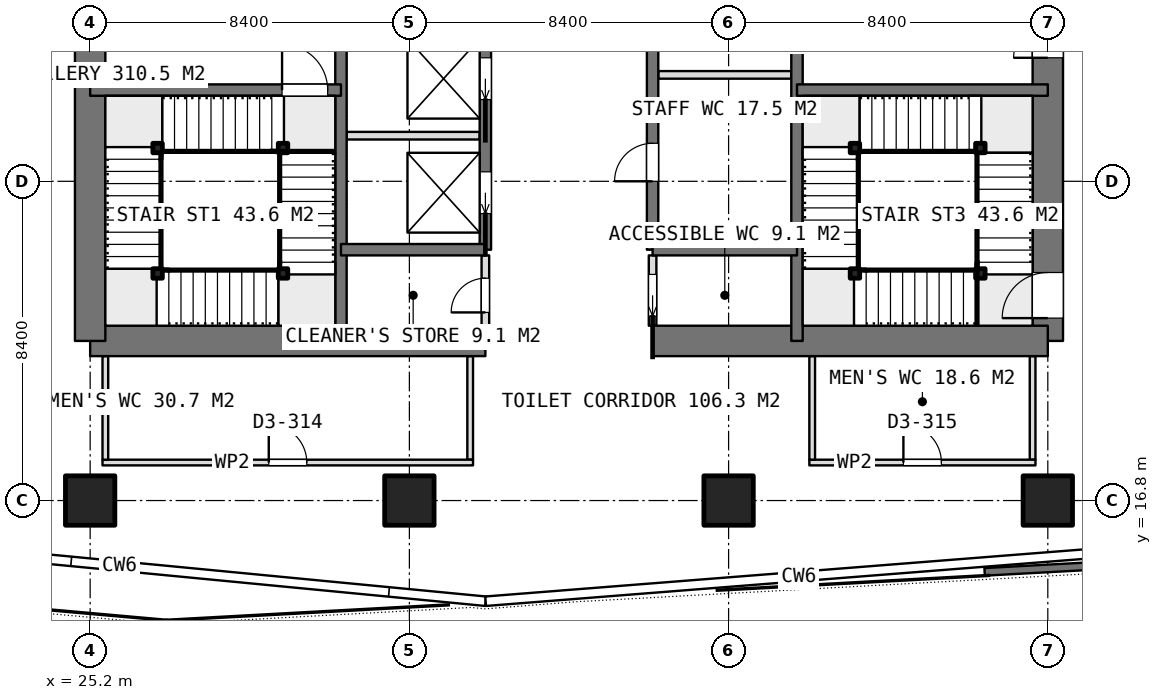
"""IFC4 building model, lengths in metres.
Left out: names, types, materials, properties, quantities, classifications, styles, units other than length and angle.
Written with IfcOpenShell. Run it as: python <this file> out.ifc"""

import sys

from ifc_helpers import new_model, si_unit, direction, frame, frame_2d, origin, origin_2d, place, context, subcontext, project, spatial, rectangle, extrude, element, fill, save


model = new_model("IFC4")
c1 = context("Model", 3, precision=1e-05, world=origin(), true_north=direction((0.0, 1.0)))
c2 = subcontext(c1, "Body", "Model", "MODEL_VIEW")
j1 = project(units=[si_unit("LENGTHUNIT", "METRE"), si_unit("PLANEANGLEUNIT", "RADIAN")], contexts=[c1])
p1 = place(None, origin())
s1 = spatial("IfcSite", under=j1, at=p1, CompositionType="ELEMENT")
p2 = place(p1, origin())
s2 = spatial("IfcBuilding", under=s1, at=p2, CompositionType="ELEMENT")
p3 = place(p2, frame((0.0, 0.0, 291.35)))
s3 = spatial("IfcBuildingStorey", under=s2, at=p3, CompositionType="ELEMENT", Elevation=291.35)
p4 = place(p3, frame((25.2, 21.0, 0.0), z_axis=(0.0, 0.0, 1.0), x_axis=(1.0, 0.0, 0.0)))
e1 = element("IfcWall", 1, at=p4, inside=s3, PredefinedType="SHEAR", context=c2, shape_type="SweptSolid", body=[
    extrude(rectangle(XDim=10.4, YDim=0.8, at=frame_2d((5.2, 0.0))), origin(), (0.0, 0.0, 1.0), 5.4),
])
p5 = place(p3, frame((40.0, 21.0, 0.0), z_axis=(0.0, 0.0, 1.0), x_axis=(1.0, 0.0, 0.0)))
e2 = element("IfcWall", 2, at=p5, inside=s3, PredefinedType="SHEAR", context=c2, shape_type="SweptSolid", body=[
    extrude(rectangle(XDim=10.4, YDim=0.8, at=frame_2d((5.2, 0.0))), origin(), (0.0, 0.0, 1.0), 5.4),
])
p6 = place(p3, frame((25.2, 21.0, 0.0), z_axis=(0.0, 0.0, 1.0), x_axis=(0.0, 1.0, 0.0)))
e3 = element("IfcWall", 3, at=p6, inside=s3, PredefinedType="SHEAR", context=c2, shape_type="SweptSolid", body=[
    extrude(rectangle(XDim=25.2, YDim=0.8, at=frame_2d((12.6, 0.0))), origin(), (0.0, 0.0, 1.0), 5.4),
])
p7 = place(p6, frame((7.8, 0.0, 0.0)))
e4 = element("IfcOpeningElement", 4, at=p7, cuts=e3, PredefinedType="OPENING", context=c2, shape_type="SweptSolid", body=[
    extrude(rectangle(XDim=1.2, YDim=2.1, at=frame_2d((0.6, 1.05))), frame((0.0, 0.41, 0.0), z_axis=(0.0, -1.0, 0.0), x_axis=(1.0, 0.0, 0.0)), (0.0, 0.0, 1.0), 0.82),
])
p8 = place(p6, frame((14.25, 0.0, 0.0)))
e5 = element("IfcOpeningElement", 5, at=p8, cuts=e3, PredefinedType="OPENING", context=c2, shape_type="SweptSolid", body=[
    extrude(rectangle(XDim=0.9, YDim=2.1, at=frame_2d((0.45, 1.05))), frame((0.0, 0.41, 0.0), z_axis=(0.0, -1.0, 0.0), x_axis=(1.0, 0.0, 0.0)), (0.0, 0.0, 1.0), 0.82),
])
p9 = place(p6, frame((16.85, 0.0, 0.0)))
e6 = element("IfcOpeningElement", 6, at=p9, cuts=e3, PredefinedType="OPENING", context=c2, shape_type="SweptSolid", body=[
    extrude(rectangle(XDim=0.9, YDim=2.1, at=frame_2d((0.45, 1.05))), frame((0.0, 0.41, 0.0), z_axis=(0.0, -1.0, 0.0), x_axis=(1.0, 0.0, 0.0)), (0.0, 0.0, 1.0), 0.82),
])
p10 = place(p6, frame((18.95, 0.0, 0.0)))
e7 = element("IfcOpeningElement", 7, at=p10, cuts=e3, PredefinedType="OPENING", context=c2, shape_type="SweptSolid", body=[
    extrude(rectangle(XDim=1.2, YDim=2.1, at=frame_2d((0.6, 1.05))), frame((0.0, 0.41, 0.0), z_axis=(0.0, -1.0, 0.0), x_axis=(1.0, 0.0, 0.0)), (0.0, 0.0, 1.0), 0.82),
])
p11 = place(p3, frame((50.4, 21.0, 0.0), z_axis=(0.0, 0.0, 1.0), x_axis=(0.0, 1.0, 0.0)))
e8 = element("IfcWall", 8, at=p11, inside=s3, PredefinedType="SHEAR", context=c2, shape_type="SweptSolid", body=[
    extrude(rectangle(XDim=25.2, YDim=0.8, at=frame_2d((12.6, 0.0))), origin(), (0.0, 0.0, 1.0), 5.4),
])
p12 = place(p11, frame((16.2, 0.0, 0.0)))
e9 = element("IfcOpeningElement", 9, at=p12, cuts=e8, PredefinedType="OPENING", context=c2, shape_type="SweptSolid", body=[
    extrude(rectangle(XDim=1.2, YDim=2.1, at=frame_2d((0.6, 1.05))), frame((0.0, 0.41, 0.0), z_axis=(0.0, -1.0, 0.0), x_axis=(1.0, 0.0, 0.0)), (0.0, 0.0, 1.0), 0.82),
])
p13 = place(p11, frame((10.05, 0.0, 0.0)))
e10 = element("IfcOpeningElement", 10, at=p13, cuts=e8, PredefinedType="OPENING", context=c2, shape_type="SweptSolid", body=[
    extrude(rectangle(XDim=0.9, YDim=2.1, at=frame_2d((0.45, 1.05))), frame((0.0, 0.41, 0.0), z_axis=(0.0, -1.0, 0.0), x_axis=(1.0, 0.0, 0.0)), (0.0, 0.0, 1.0), 0.82),
])
p14 = place(p11, frame((7.45, 0.0, 0.0)))
e11 = element("IfcOpeningElement", 11, at=p14, cuts=e8, PredefinedType="OPENING", context=c2, shape_type="SweptSolid", body=[
    extrude(rectangle(XDim=0.9, YDim=2.1, at=frame_2d((0.45, 1.05))), frame((0.0, 0.41, 0.0), z_axis=(0.0, -1.0, 0.0), x_axis=(1.0, 0.0, 0.0)), (0.0, 0.0, 1.0), 0.82),
])
p15 = place(p11, frame((0.6, 0.0, 0.0)))
e12 = element("IfcOpeningElement", 12, at=p15, cuts=e8, PredefinedType="OPENING", context=c2, shape_type="SweptSolid", body=[
    extrude(rectangle(XDim=1.2, YDim=2.1, at=frame_2d((0.6, 1.05))), frame((0.0, 0.41, 0.0), z_axis=(0.0, -1.0, 0.0), x_axis=(1.0, 0.0, 0.0)), (0.0, 0.0, 1.0), 0.82),
])
for number, where, z_axis, x_axis in (
    (13, (31.8, 21.0, 0.0), (0.0, 0.0, 1.0), (0.0, 1.0, 0.0)),
    (14, (43.8, 21.0, 0.0), (0.0, 0.0, 1.0), (0.0, 1.0, 0.0)),
):
    element("IfcWall", number, at=place(p3, frame(where, z_axis=z_axis, x_axis=x_axis)), inside=s3, PredefinedType="SHEAR", context=c2, shape_type="SweptSolid", body=[
        extrude(rectangle(XDim=25.2, YDim=0.3, at=frame_2d((12.6, 0.0))), origin(), (0.0, 0.0, 1.0), 5.4),
    ])
p16 = place(p3, frame((35.6, 23.4, 0.0), z_axis=(0.0, 0.0, 1.0), x_axis=(0.0, 1.0, 0.0)))
e15 = element("IfcWall", 15, at=p16, inside=s3, PredefinedType="SHEAR", context=c2, shape_type="SweptSolid", body=[
    extrude(rectangle(XDim=18.0, YDim=0.3, at=frame_2d((9.0, 0.0))), origin(), (0.0, 0.0, 1.0), 5.4),
])
p17 = place(p16, frame((0.95, 0.0, 0.0)))
e16 = element("IfcOpeningElement", 16, at=p17, cuts=e15, PredefinedType="OPENING", context=c2, shape_type="SweptSolid", body=[
    extrude(rectangle(XDim=1.1, YDim=2.1, at=frame_2d((0.55, 1.05))), frame((0.0, 0.16, 0.0), z_axis=(0.0, -1.0, 0.0), x_axis=(1.0, 0.0, 0.0)), (0.0, 0.0, 1.0), 0.32),
])
p18 = place(p16, frame((3.95, 0.0, 0.0)))
e17 = element("IfcOpeningElement", 17, at=p18, cuts=e15, PredefinedType="OPENING", context=c2, shape_type="SweptSolid", body=[
    extrude(rectangle(XDim=1.1, YDim=2.1, at=frame_2d((0.55, 1.05))), frame((0.0, 0.16, 0.0), z_axis=(0.0, -1.0, 0.0), x_axis=(1.0, 0.0, 0.0)), (0.0, 0.0, 1.0), 0.32),
])
p19 = place(p16, frame((6.95, 0.0, 0.0)))
e18 = element("IfcOpeningElement", 18, at=p19, cuts=e15, PredefinedType="OPENING", context=c2, shape_type="SweptSolid", body=[
    extrude(rectangle(XDim=1.1, YDim=2.1, at=frame_2d((0.55, 1.05))), frame((0.0, 0.16, 0.0), z_axis=(0.0, -1.0, 0.0), x_axis=(1.0, 0.0, 0.0)), (0.0, 0.0, 1.0), 0.32),
])
p20 = place(p16, frame((9.95, 0.0, 0.0)))
e19 = element("IfcOpeningElement", 19, at=p20, cuts=e15, PredefinedType="OPENING", context=c2, shape_type="SweptSolid", body=[
    extrude(rectangle(XDim=1.1, YDim=2.1, at=frame_2d((0.55, 1.05))), frame((0.0, 0.16, 0.0), z_axis=(0.0, -1.0, 0.0), x_axis=(1.0, 0.0, 0.0)), (0.0, 0.0, 1.0), 0.32),
])
p21 = place(p16, frame((12.95, 0.0, 0.0)))
e20 = element("IfcOpeningElement", 20, at=p21, cuts=e15, PredefinedType="OPENING", context=c2, shape_type="SweptSolid", body=[
    extrude(rectangle(XDim=1.1, YDim=2.1, at=frame_2d((0.55, 1.05))), frame((0.0, 0.16, 0.0), z_axis=(0.0, -1.0, 0.0), x_axis=(1.0, 0.0, 0.0)), (0.0, 0.0, 1.0), 0.32),
])
p22 = place(p16, frame((15.95, 0.0, 0.0)))
e21 = element("IfcOpeningElement", 21, at=p22, cuts=e15, PredefinedType="OPENING", context=c2, shape_type="SweptSolid", body=[
    extrude(rectangle(XDim=1.1, YDim=2.1, at=frame_2d((0.55, 1.05))), frame((0.0, 0.16, 0.0), z_axis=(0.0, -1.0, 0.0), x_axis=(1.0, 0.0, 0.0)), (0.0, 0.0, 1.0), 0.32),
])
p23 = place(p3, frame((40.0, 23.4, 0.0), z_axis=(0.0, 0.0, 1.0), x_axis=(0.0, 1.0, 0.0)))
e22 = element("IfcWall", 22, at=p23, inside=s3, PredefinedType="SHEAR", context=c2, shape_type="SweptSolid", body=[
    extrude(rectangle(XDim=18.0, YDim=0.3, at=frame_2d((9.0, 0.0))), origin(), (0.0, 0.0, 1.0), 5.4),
])
p24 = place(p23, frame((1.8, 0.0, 0.0)))
e23 = element("IfcOpeningElement", 23, at=p24, cuts=e22, PredefinedType="OPENING", context=c2, shape_type="SweptSolid", body=[
    extrude(rectangle(XDim=1.0, YDim=2.1, at=frame_2d((0.5, 1.05))), frame((0.0, 0.16, 0.0), z_axis=(0.0, -1.0, 0.0), x_axis=(1.0, 0.0, 0.0)), (0.0, 0.0, 1.0), 0.32),
])
p25 = place(p23, frame((5.75, 0.0, 0.0)))
e24 = element("IfcOpeningElement", 24, at=p25, cuts=e22, PredefinedType="OPENING", context=c2, shape_type="SweptSolid", body=[
    extrude(rectangle(XDim=0.9, YDim=2.1, at=frame_2d((0.45, 1.05))), frame((0.0, 0.16, 0.0), z_axis=(0.0, -1.0, 0.0), x_axis=(1.0, 0.0, 0.0)), (0.0, 0.0, 1.0), 0.32),
])
p26 = place(p23, frame((9.4, 0.0, 0.0)))
e25 = element("IfcOpeningElement", 25, at=p26, cuts=e22, PredefinedType="OPENING", context=c2, shape_type="SweptSolid", body=[
    extrude(rectangle(XDim=1.0, YDim=2.1, at=frame_2d((0.5, 1.05))), frame((0.0, 0.16, 0.0), z_axis=(0.0, -1.0, 0.0), x_axis=(1.0, 0.0, 0.0)), (0.0, 0.0, 1.0), 0.32),
])
p27 = place(p23, frame((12.95, 0.0, 0.0)))
e26 = element("IfcOpeningElement", 26, at=p27, cuts=e22, PredefinedType="OPENING", context=c2, shape_type="SweptSolid", body=[
    extrude(rectangle(XDim=1.1, YDim=2.1, at=frame_2d((0.55, 1.05))), frame((0.0, 0.16, 0.0), z_axis=(0.0, -1.0, 0.0), x_axis=(1.0, 0.0, 0.0)), (0.0, 0.0, 1.0), 0.32),
])
p28 = place(p23, frame((15.95, 0.0, 0.0)))
e27 = element("IfcOpeningElement", 27, at=p28, cuts=e22, PredefinedType="OPENING", context=c2, shape_type="SweptSolid", body=[
    extrude(rectangle(XDim=1.1, YDim=2.1, at=frame_2d((0.55, 1.05))), frame((0.0, 0.16, 0.0), z_axis=(0.0, -1.0, 0.0), x_axis=(1.0, 0.0, 0.0)), (0.0, 0.0, 1.0), 0.32),
])
for number, where, z_axis, x_axis in (
    (28, (31.8, 23.4, 0.0), (0.0, 0.0, 1.0), (1.0, 0.0, 0.0)),
    (29, (40.0, 23.4, 0.0), (0.0, 0.0, 1.0), (1.0, 0.0, 0.0)),
):
    element("IfcWall", number, at=place(p3, frame(where, z_axis=z_axis, x_axis=x_axis)), inside=s3, PredefinedType="SHEAR", context=c2, shape_type="SweptSolid", body=[
        extrude(rectangle(XDim=3.8, YDim=0.3, at=frame_2d((1.9, 0.0))), origin(), (0.0, 0.0, 1.0), 5.4),
    ])
p29 = place(p3, frame((25.2, 27.6, 0.0), z_axis=(0.0, 0.0, 1.0), x_axis=(1.0, 0.0, 0.0)))
e30 = element("IfcWall", 30, at=p29, inside=s3, PredefinedType="SHEAR", context=c2, shape_type="SweptSolid", body=[
    extrude(rectangle(XDim=6.6, YDim=0.3, at=frame_2d((3.3, 0.0))), origin(), (0.0, 0.0, 1.0), 5.4),
])
p30 = place(p29, frame((5.05, 0.0, 0.0)))
e31 = element("IfcOpeningElement", 31, at=p30, cuts=e30, PredefinedType="OPENING", context=c2, shape_type="SweptSolid", body=[
    extrude(rectangle(XDim=1.2, YDim=2.1, at=frame_2d((0.6, 1.05))), frame((0.0, 0.16, 0.0), z_axis=(0.0, -1.0, 0.0), x_axis=(1.0, 0.0, 0.0)), (0.0, 0.0, 1.0), 0.32),
])
p31 = place(p3, frame((43.8, 27.6, 0.0), z_axis=(0.0, 0.0, 1.0), x_axis=(1.0, 0.0, 0.0)))
e32 = element("IfcWall", 32, at=p31, inside=s3, PredefinedType="SHEAR", context=c2, shape_type="SweptSolid", body=[
    extrude(rectangle(XDim=6.6, YDim=0.3, at=frame_2d((3.3, 0.0))), origin(), (0.0, 0.0, 1.0), 5.4),
])
for number, where, z_axis, x_axis in (
    (33, (25.2, 16.8, 0.0), (0.0, 0.0, 1.0), (1.0, 0.0, 0.0)),
    (34, (33.6, 16.8, 0.0), (0.0, 0.0, 1.0), (1.0, 0.0, 0.0)),
    (35, (42.0, 16.8, 0.0), (0.0, 0.0, 1.0), (1.0, 0.0, 0.0)),
    (36, (50.4, 16.8, 0.0), (0.0, 0.0, 1.0), (1.0, 0.0, 0.0)),
):
    element("IfcColumn", number, at=place(p3, frame(where, z_axis=z_axis, x_axis=x_axis)), inside=s3, PredefinedType="COLUMN", context=c2, shape_type="SweptSolid", body=[
        extrude(rectangle(XDim=1.3, YDim=1.3, at=origin_2d()), origin(), (0.0, 0.0, 1.0), 5.4),
    ])
p32 = place(p3, frame((48.737, 14.923, 0.0), z_axis=(0.0, 0.0, 1.0), x_axis=(0.998519515353, 0.054394645497, 0.0)))
e37 = element("IfcWall", 37, at=p32, inside=s3, PredefinedType="PARAPET", context=c2, shape_type="SweptSolid", body=[
    extrude(rectangle(XDim=11.342, YDim=0.2, at=frame_2d((5.671, 0.0))), origin(), (0.0, 0.0, 1.0), 1.1),
])
p33 = place(p3, frame((31.95, 26.4, 0.0), z_axis=(0.0, 0.0, 1.0), x_axis=(1.0, 0.0, 0.0)))
e38 = element("IfcWall", 38, at=p33, inside=s3, PredefinedType="PARTITIONING", context=c2, shape_type="SweptSolid", body=[
    extrude(rectangle(XDim=3.5, YDim=0.2, at=frame_2d((1.75, 0.0))), origin(), (0.0, 0.0, 1.0), 5.1),
])
p34 = place(p3, frame((40.0, 21.4, 0.0), z_axis=(0.0, 0.0, 1.0), x_axis=(0.0, 1.0, 0.0)))
e39 = element("IfcWall", 39, at=p34, inside=s3, PredefinedType="PARTITIONING", context=c2, shape_type="SweptSolid", body=[
    extrude(rectangle(XDim=1.85, YDim=0.2, at=frame_2d((0.925, 0.0))), origin(), (0.0, 0.0, 1.0), 5.1),
])
p35 = place(p34, frame((0.25, 0.0, 0.0)))
e40 = element("IfcOpeningElement", 40, at=p35, cuts=e39, PredefinedType="OPENING", context=c2, shape_type="SweptSolid", body=[
    extrude(rectangle(XDim=1.1, YDim=2.1, at=frame_2d((0.55, 1.05))), frame((0.0, 0.11, 0.0), z_axis=(0.0, -1.0, 0.0), x_axis=(1.0, 0.0, 0.0)), (0.0, 0.0, 1.0), 0.22),
])
p36 = place(p3, frame((35.6, 21.4, 0.0), z_axis=(0.0, 0.0, 1.0), x_axis=(0.0, 1.0, 0.0)))
e41 = element("IfcWall", 41, at=p36, inside=s3, PredefinedType="PARTITIONING", context=c2, shape_type="SweptSolid", body=[
    extrude(rectangle(XDim=1.85, YDim=0.2, at=frame_2d((0.925, 0.0))), origin(), (0.0, 0.0, 1.0), 5.1),
])
p37 = place(p36, frame((0.35, 0.0, 0.0)))
e42 = element("IfcOpeningElement", 42, at=p37, cuts=e41, PredefinedType="OPENING", context=c2, shape_type="SweptSolid", body=[
    extrude(rectangle(XDim=0.9, YDim=2.1, at=frame_2d((0.45, 1.05))), frame((0.0, 0.11, 0.0), z_axis=(0.0, -1.0, 0.0), x_axis=(1.0, 0.0, 0.0)), (0.0, 0.0, 1.0), 0.22),
])
p38 = place(p3, frame((40.15, 28.0, 0.0), z_axis=(0.0, 0.0, 1.0), x_axis=(1.0, 0.0, 0.0)))
e43 = element("IfcWall", 43, at=p38, inside=s3, PredefinedType="PARTITIONING", context=c2, shape_type="SweptSolid", body=[
    extrude(rectangle(XDim=3.5, YDim=0.2, at=frame_2d((1.75, 0.0))), origin(), (0.0, 0.0, 1.0), 5.1),
])
p39 = place(p3, frame((25.525, 17.8, 0.0), z_axis=(0.0, 0.0, 1.0), x_axis=(1.0, 0.0, 0.0)))
e44 = element("IfcWall", 44, at=p39, inside=s3, PredefinedType="PARTITIONING", context=c2, shape_type="SweptSolid", body=[
    extrude(rectangle(XDim=9.75, YDim=0.15, at=frame_2d((4.875, 0.0))), origin(), (0.0, 0.0, 1.0), 5.1),
])
p40 = place(p39, frame((4.375, 0.0, 0.0)))
e45 = element("IfcOpeningElement", 45, at=p40, cuts=e44, PredefinedType="OPENING", context=c2, shape_type="SweptSolid", body=[
    extrude(rectangle(XDim=1.0, YDim=2.1, at=frame_2d((0.5, 1.05))), frame((0.0, 0.085, 0.0), z_axis=(0.0, -1.0, 0.0), x_axis=(1.0, 0.0, 0.0)), (0.0, 0.0, 1.0), 0.17),
])
for number, where, z_axis, x_axis in (
    (46, (25.6, 17.875, 0.0), (0.0, 0.0, 1.0), (0.0, 1.0, 0.0)),
    (47, (35.2, 17.875, 0.0), (0.0, 0.0, 1.0), (0.0, 1.0, 0.0)),
):
    element("IfcWall", number, at=place(p3, frame(where, z_axis=z_axis, x_axis=x_axis)), inside=s3, PredefinedType="PARTITIONING", context=c2, shape_type="SweptSolid", body=[
        extrude(rectangle(XDim=2.725, YDim=0.15, at=frame_2d((1.363, 0.0))), origin(), (0.0, 0.0, 1.0), 5.1),
    ])
p41 = place(p3, frame((44.125, 17.8, 0.0), z_axis=(0.0, 0.0, 1.0), x_axis=(1.0, 0.0, 0.0)))
e48 = element("IfcWall", 48, at=p41, inside=s3, PredefinedType="PARTITIONING", context=c2, shape_type="SweptSolid", body=[
    extrude(rectangle(XDim=5.95, YDim=0.15, at=frame_2d((2.975, 0.0))), origin(), (0.0, 0.0, 1.0), 5.1),
])
p42 = place(p41, frame((2.475, 0.0, 0.0)))
e49 = element("IfcOpeningElement", 49, at=p42, cuts=e48, PredefinedType="OPENING", context=c2, shape_type="SweptSolid", body=[
    extrude(rectangle(XDim=1.0, YDim=2.1, at=frame_2d((0.5, 1.05))), frame((0.0, 0.085, 0.0), z_axis=(0.0, -1.0, 0.0), x_axis=(1.0, 0.0, 0.0)), (0.0, 0.0, 1.0), 0.17),
])
for number, where, z_axis, x_axis in (
    (50, (44.2, 17.875, 0.0), (0.0, 0.0, 1.0), (0.0, 1.0, 0.0)),
    (51, (50.0, 17.875, 0.0), (0.0, 0.0, 1.0), (0.0, 1.0, 0.0)),
):
    element("IfcWall", number, at=place(p3, frame(where, z_axis=z_axis, x_axis=x_axis)), inside=s3, PredefinedType="PARTITIONING", context=c2, shape_type="SweptSolid", body=[
        extrude(rectangle(XDim=2.725, YDim=0.15, at=frame_2d((1.363, 0.0))), origin(), (0.0, 0.0, 1.0), 5.1),
    ])
for number, where, z_axis, x_axis in (
    (52, (30.275, 26.075, 0.0), (0.0, 0.0, 1.0), (1.0, 0.0, 0.0)),
    (53, (30.275, 22.775, 0.0), (0.0, 0.0, 1.0), (1.0, 0.0, 0.0)),
    (54, (26.975, 22.775, 0.0), (0.0, 0.0, 1.0), (1.0, 0.0, 0.0)),
    (55, (26.975, 26.075, 0.0), (0.0, 0.0, 1.0), (1.0, 0.0, 0.0)),
    (56, (48.625, 22.775, 0.0), (0.0, 0.0, 1.0), (1.0, 0.0, 0.0)),
    (57, (45.325, 22.775, 0.0), (0.0, 0.0, 1.0), (1.0, 0.0, 0.0)),
    (58, (45.325, 26.075, 0.0), (0.0, 0.0, 1.0), (1.0, 0.0, 0.0)),
    (59, (48.625, 26.075, 0.0), (0.0, 0.0, 1.0), (1.0, 0.0, 0.0)),
):
    element("IfcColumn", number, at=place(p3, frame(where, z_axis=z_axis, x_axis=x_axis)), inside=s3, PredefinedType="COLUMN", context=c2, shape_type="SweptSolid", body=[
        extrude(rectangle(XDim=0.25, YDim=0.25, at=origin_2d()), origin(), (0.0, 0.0, 1.0), 5.4),
    ])
p43 = place(p14, origin())
e60 = element("IfcDoor", 60, at=p43, inside=s3, OperationType="SINGLE_SWING_LEFT", PredefinedType="DOOR", context=c2, shape_type="SweptSolid", body=[
    extrude(rectangle(XDim=0.9, YDim=2.1, at=frame_2d((0.45, 1.05))), frame((0.0, 0.025, 0.0), z_axis=(0.0, -1.0, 0.0), x_axis=(1.0, 0.0, 0.0)), (0.0, 0.0, 1.0), 0.05),
])
fill(e11, e60)
p44 = place(p35, origin())
e61 = element("IfcDoor", 61, at=p44, inside=s3, OperationType="SLIDING_TO_LEFT", PredefinedType="DOOR", context=c2, shape_type="SweptSolid", body=[
    extrude(rectangle(XDim=1.1, YDim=2.1, at=frame_2d((0.55, 1.05))), frame((0.0, 0.025, 0.0), z_axis=(0.0, -1.0, 0.0), x_axis=(1.0, 0.0, 0.0)), (0.0, 0.0, 1.0), 0.05),
])
fill(e40, e61)
p45 = place(p37, origin())
e62 = element("IfcDoor", 62, at=p45, inside=s3, OperationType="SINGLE_SWING_LEFT", PredefinedType="DOOR", context=c2, shape_type="SweptSolid", body=[
    extrude(rectangle(XDim=0.9, YDim=2.1, at=frame_2d((0.45, 1.05))), frame((0.0, 0.025, 0.0), z_axis=(0.0, -1.0, 0.0), x_axis=(1.0, 0.0, 0.0)), (0.0, 0.0, 1.0), 0.05),
])
fill(e42, e62)
p46 = place(p24, origin())
e63 = element("IfcDoor", 63, at=p46, inside=s3, OperationType="SINGLE_SWING_LEFT", PredefinedType="DOOR", context=c2, shape_type="SweptSolid", body=[
    extrude(rectangle(XDim=1.0, YDim=2.1, at=frame_2d((0.5, 1.05))), frame((0.0, 0.025, 0.0), z_axis=(0.0, -1.0, 0.0), x_axis=(1.0, 0.0, 0.0)), (0.0, 0.0, 1.0), 0.05),
])
fill(e23, e63)
p47 = place(p17, origin())
e64 = element("IfcDoor", 64, at=p47, inside=s3, OperationType="SLIDING_TO_LEFT", PredefinedType="USERDEFINED", context=c2, shape_type="SweptSolid", body=[
    extrude(rectangle(XDim=1.1, YDim=2.1, at=frame_2d((0.55, 1.05))), frame((0.0, 0.025, 0.0), z_axis=(0.0, -1.0, 0.0), x_axis=(1.0, 0.0, 0.0)), (0.0, 0.0, 1.0), 0.05),
])
fill(e16, e64)
p48 = place(p18, origin())
e65 = element("IfcDoor", 65, at=p48, inside=s3, OperationType="SLIDING_TO_LEFT", PredefinedType="USERDEFINED", context=c2, shape_type="SweptSolid", body=[
    extrude(rectangle(XDim=1.1, YDim=2.1, at=frame_2d((0.55, 1.05))), frame((0.0, 0.025, 0.0), z_axis=(0.0, -1.0, 0.0), x_axis=(1.0, 0.0, 0.0)), (0.0, 0.0, 1.0), 0.05),
])
fill(e17, e65)
p49 = place(p40, origin())
e66 = element("IfcDoor", 66, at=p49, inside=s3, OperationType="SINGLE_SWING_LEFT", PredefinedType="DOOR", context=c2, shape_type="SweptSolid", body=[
    extrude(rectangle(XDim=1.0, YDim=2.1, at=frame_2d((0.5, 1.05))), frame((0.0, 0.025, 0.0), z_axis=(0.0, -1.0, 0.0), x_axis=(1.0, 0.0, 0.0)), (0.0, 0.0, 1.0), 0.05),
])
fill(e45, e66)
p50 = place(p42, origin())
e67 = element("IfcDoor", 67, at=p50, inside=s3, OperationType="SINGLE_SWING_LEFT", PredefinedType="DOOR", context=c2, shape_type="SweptSolid", body=[
    extrude(rectangle(XDim=1.0, YDim=2.1, at=frame_2d((0.5, 1.05))), frame((0.0, 0.025, 0.0), z_axis=(0.0, -1.0, 0.0), x_axis=(1.0, 0.0, 0.0)), (0.0, 0.0, 1.0), 0.05),
])
fill(e49, e67)
p51 = place(p30, origin())
e68 = element("IfcDoor", 68, at=p51, inside=s3, OperationType="SINGLE_SWING_RIGHT", PredefinedType="DOOR", context=c2, shape_type="SweptSolid", body=[
    extrude(rectangle(XDim=1.2, YDim=2.1, at=frame_2d((0.6, 1.05))), frame((0.0, 0.025, 0.0), z_axis=(0.0, -1.0, 0.0), x_axis=(1.0, 0.0, 0.0)), (0.0, 0.0, 1.0), 0.05),
])
fill(e31, e68)
p52 = place(p15, origin())
e69 = element("IfcDoor", 69, at=p52, inside=s3, OperationType="SINGLE_SWING_RIGHT", PredefinedType="DOOR", context=c2, shape_type="SweptSolid", body=[
    extrude(rectangle(XDim=1.2, YDim=2.1, at=frame_2d((0.6, 1.05))), frame((0.0, 0.025, 0.0), z_axis=(0.0, -1.0, 0.0), x_axis=(1.0, 0.0, 0.0)), (0.0, 0.0, 1.0), 0.05),
])
fill(e12, e69)
save(model, sys.argv[1])
